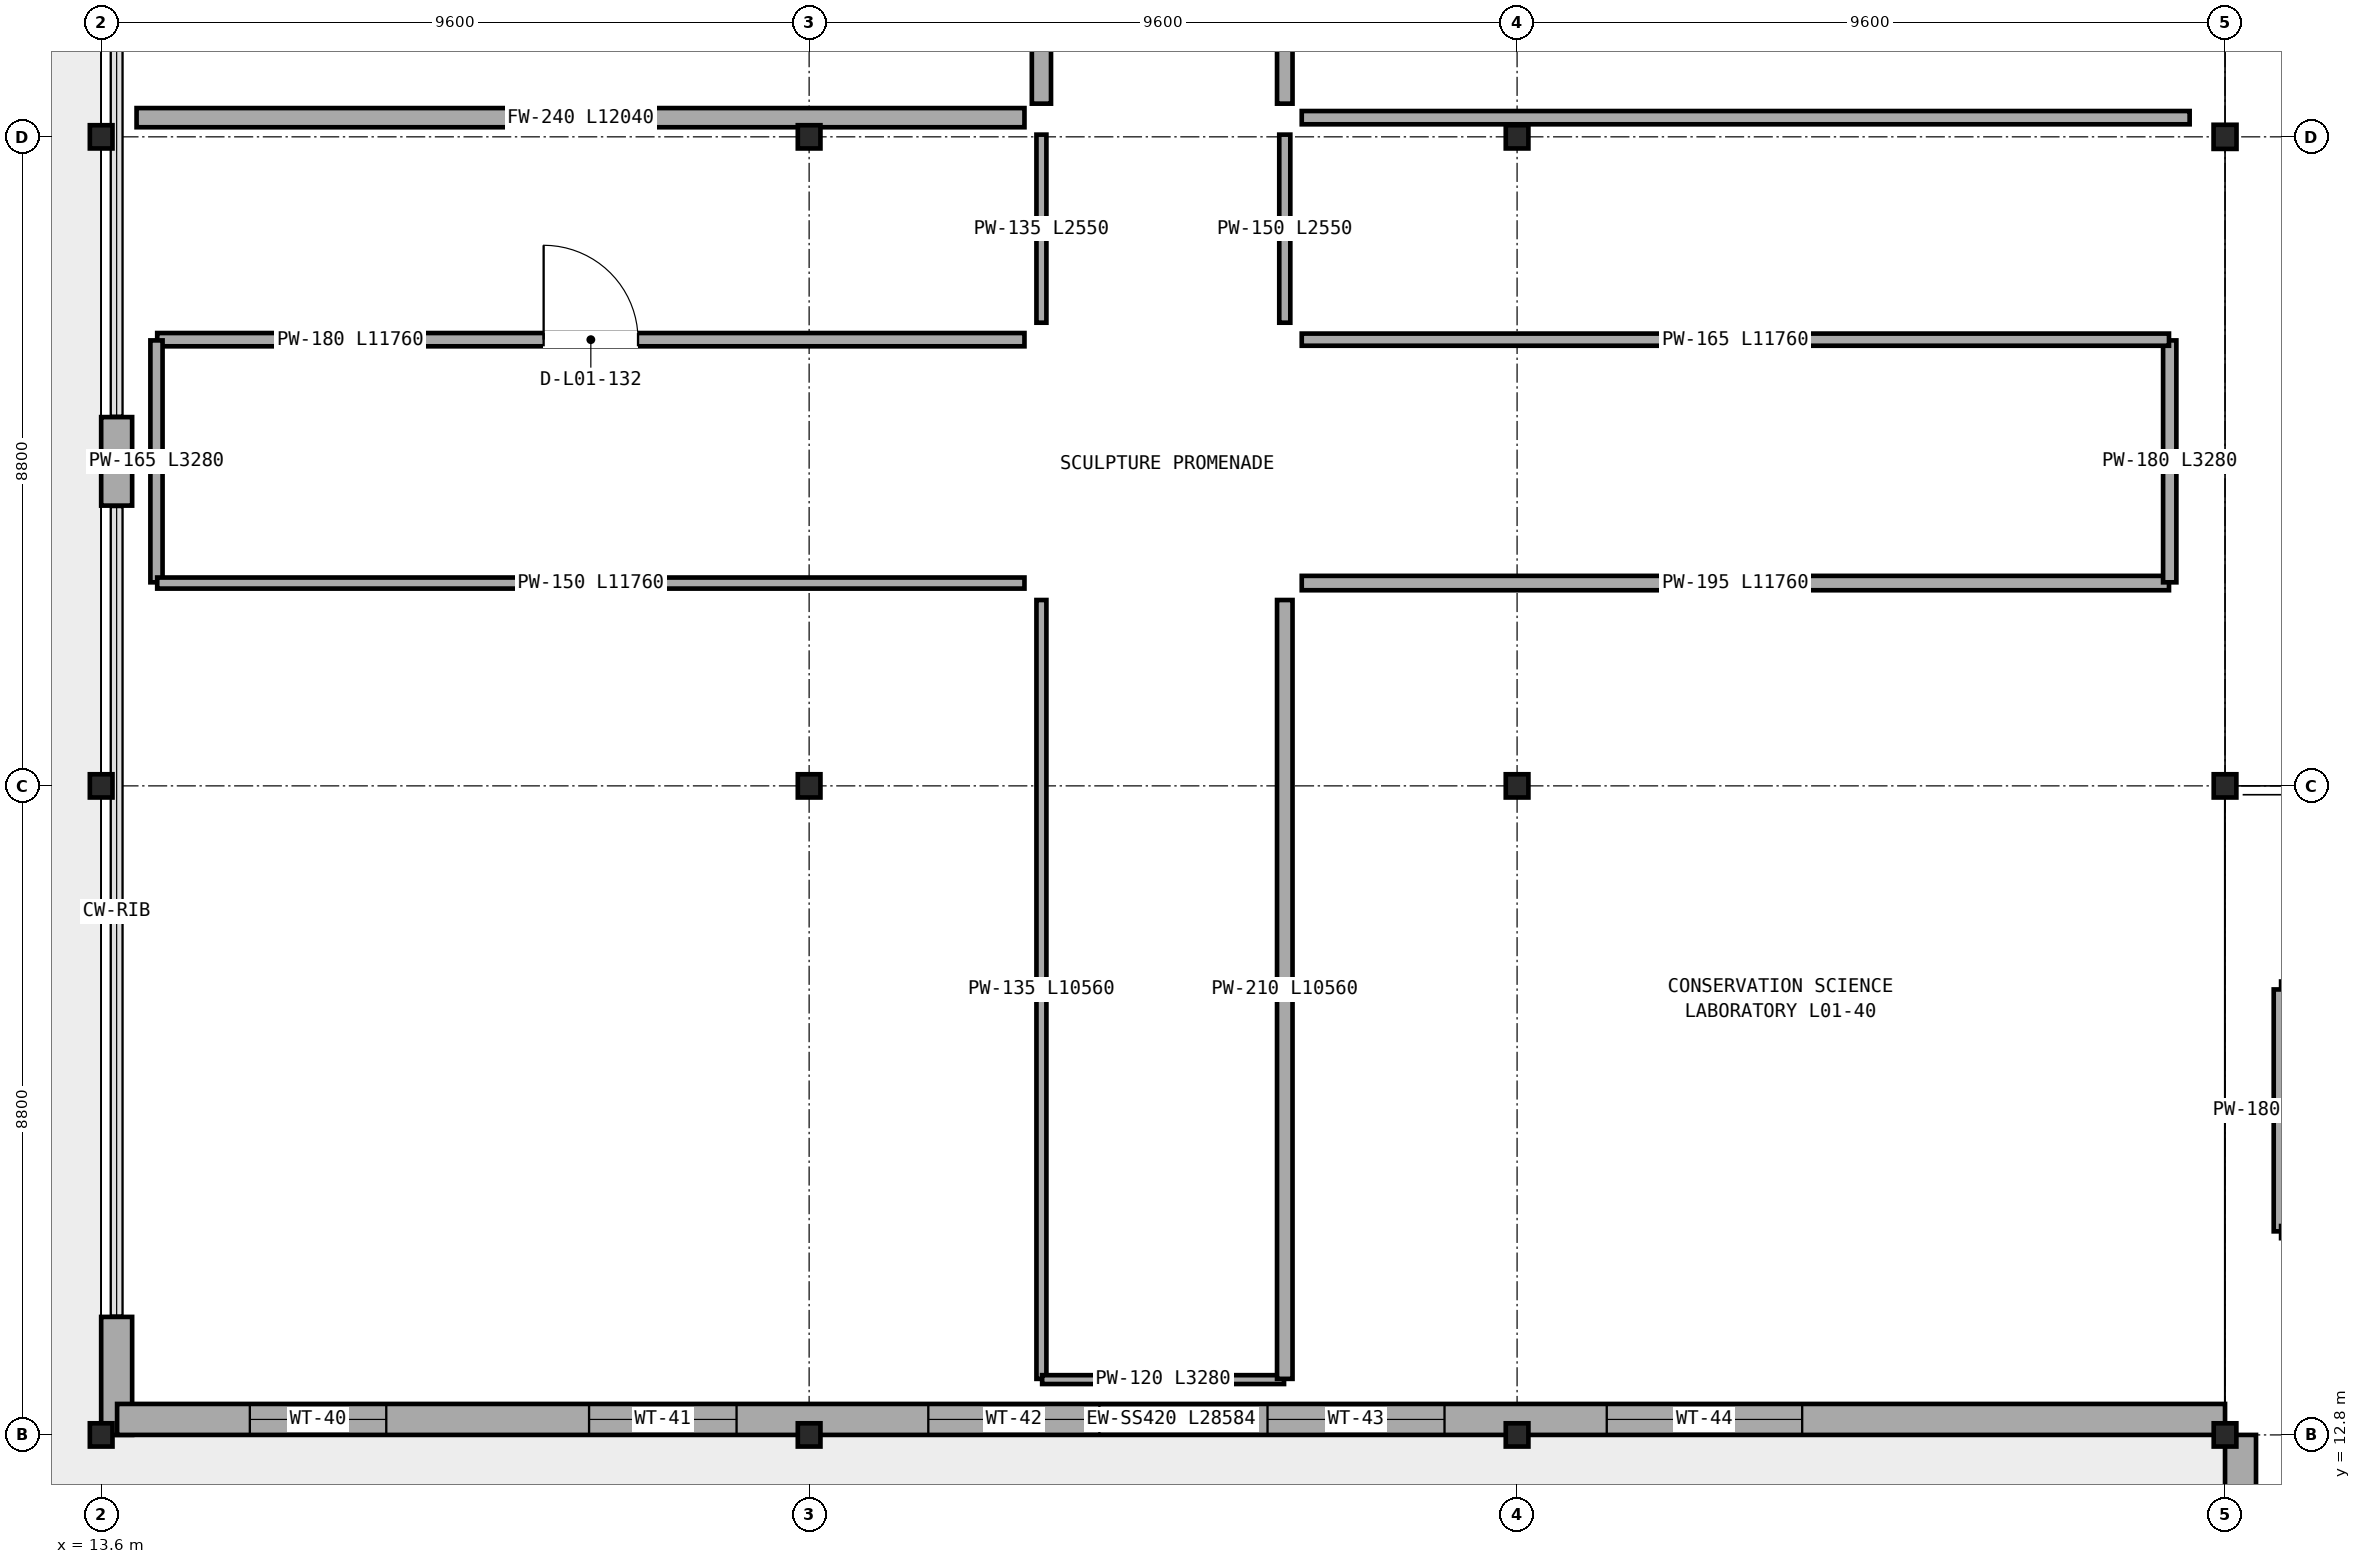
"""IFC4 building model, lengths in metres.
Left out: names, types, materials, properties, quantities, classifications, styles, units other than length and angle.
Written with IfcOpenShell. Run it as: python <this file> out.ifc"""

import sys

from ifc_helpers import new_model, si_unit, direction, frame, frame_2d, origin, origin_2d, place, context, subcontext, project, spatial, rectangle, i_section, extrude, element, fill, save


model = new_model("IFC4")
c1 = context("Model", 3, precision=1e-05, world=origin(), true_north=direction((0.0, 1.0)))
c2 = subcontext(c1, "Body", "Model", "MODEL_VIEW")
j1 = project(units=[si_unit("LENGTHUNIT", "METRE"), si_unit("PLANEANGLEUNIT", "RADIAN")], contexts=[c1])
p1 = place(None, origin())
s1 = spatial("IfcSite", under=j1, at=p1, CompositionType="ELEMENT")
p2 = place(p1, origin())
s2 = spatial("IfcBuilding", under=s1, at=p2, CompositionType="ELEMENT")
p3 = place(p2, frame((0.0, 0.0, 5.6)))
s3 = spatial("IfcBuildingStorey", under=s2, at=p3, CompositionType="ELEMENT", Elevation=5.6)
for number, where, z_axis, x_axis in (
    (1, (13.6, 12.8, 0.0), (0.0, 0.0, 1.0), (1.0, 0.0, 0.0)),
    (2, (13.6, 21.6, 0.0), (0.0, 0.0, 1.0), (1.0, 0.0, 0.0)),
    (3, (13.6, 30.4, 0.0), (0.0, 0.0, 1.0), (1.0, 0.0, 0.0)),
    (4, (23.2, 12.8, 0.0), (0.0, 0.0, 1.0), (1.0, 0.0, 0.0)),
    (5, (23.2, 21.6, 0.0), (0.0, 0.0, 1.0), (1.0, 0.0, 0.0)),
    (6, (23.2, 30.4, 0.0), (0.0, 0.0, 1.0), (1.0, 0.0, 0.0)),
    (7, (32.8, 12.8, 0.0), (0.0, 0.0, 1.0), (1.0, 0.0, 0.0)),
    (8, (32.8, 21.6, 0.0), (0.0, 0.0, 1.0), (1.0, 0.0, 0.0)),
    (9, (32.8, 30.4, 0.0), (0.0, 0.0, 1.0), (1.0, 0.0, 0.0)),
    (10, (42.4, 12.8, 0.0), (0.0, 0.0, 1.0), (1.0, 0.0, 0.0)),
    (11, (42.4, 21.6, 0.0), (0.0, 0.0, 1.0), (1.0, 0.0, 0.0)),
):
    element("IfcColumn", number, at=place(p3, frame(where, z_axis=z_axis, x_axis=x_axis)), inside=s3, PredefinedType="COLUMN", context=c2, shape_type="SweptSolid", body=[
        extrude(i_section(OverallWidth=0.307, OverallDepth=0.315, WebThickness=0.012, FlangeThickness=0.019, FilletRadius=0.017, at=origin_2d()), origin(), (0.0, 0.0, 1.0), 4.5),
    ])
p4 = place(p3, frame((42.4, 30.4, 0.0), z_axis=(0.0, 0.0, 1.0), x_axis=(1.0, 0.0, 0.0)))
e12 = element("IfcColumn", 12, at=p4, inside=s3, PredefinedType="COLUMN", context=c2, shape_type="SweptSolid", body=[
    extrude(i_section(OverallWidth=0.311, OverallDepth=0.327, WebThickness=0.016, FlangeThickness=0.025, FilletRadius=0.017, at=origin_2d()), origin(), (0.0, 0.0, 1.0), 4.5),
])
p5 = place(p3, frame((13.81, 26.6, 0.0), z_axis=(0.0, 0.0, 1.0), x_axis=(0.0, -1.0, 0.0)))
e13 = element("IfcWall", 13, at=p5, inside=s3, PredefinedType="SOLIDWALL", context=c2, shape_type="SweptSolid", body=[
    extrude(rectangle(XDim=1.2, YDim=0.42, at=frame_2d((0.6, 0.0))), origin(), (0.0, 0.0, 1.0), 3.818),
])
p6 = place(p3, frame((13.81, 14.4, 0.0), z_axis=(0.0, 0.0, 1.0), x_axis=(0.0, -1.0, 0.0)))
e14 = element("IfcWall", 14, at=p6, inside=s3, PredefinedType="SOLIDWALL", context=c2, shape_type="SweptSolid", body=[
    extrude(rectangle(XDim=1.6, YDim=0.42, at=frame_2d((0.8, 0.0))), origin(), (0.0, 0.0, 1.0), 3.668),
])
p7 = place(p3, frame((13.816, 13.01, 0.0), z_axis=(0.0, 0.0, 1.0), x_axis=(1.0, 0.0, 0.0)))
e15 = element("IfcWall", 15, at=p7, inside=s3, PredefinedType="SOLIDWALL", context=c2, shape_type="SweptSolid", body=[
    extrude(rectangle(XDim=28.584, YDim=0.42, at=frame_2d((14.292, 0.0))), origin(), (0.0, 0.0, 1.0), 3.668),
])
p8 = place(p7, frame((1.8, 0.0, 0.75)))
e16 = element("IfcOpeningElement", 16, at=p8, cuts=e15, PredefinedType="OPENING", context=c2, shape_type="SweptSolid", body=[
    extrude(rectangle(XDim=1.85, YDim=2.5, at=frame_2d((0.925, 1.25))), frame((0.0, 0.22, 0.0), z_axis=(0.0, -1.0, 0.0), x_axis=(1.0, 0.0, 0.0)), (0.0, 0.0, 1.0), 0.44),
])
p9 = place(p7, frame((6.4, 0.0, 0.75)))
e17 = element("IfcOpeningElement", 17, at=p9, cuts=e15, PredefinedType="OPENING", context=c2, shape_type="SweptSolid", body=[
    extrude(rectangle(XDim=2.0, YDim=2.5, at=frame_2d((1.0, 1.25))), frame((0.0, 0.22, 0.0), z_axis=(0.0, -1.0, 0.0), x_axis=(1.0, 0.0, 0.0)), (0.0, 0.0, 1.0), 0.44),
])
p10 = place(p7, frame((11.0, 0.0, 0.75)))
e18 = element("IfcOpeningElement", 18, at=p10, cuts=e15, PredefinedType="OPENING", context=c2, shape_type="SweptSolid", body=[
    extrude(rectangle(XDim=2.32, YDim=2.5, at=frame_2d((1.16, 1.25))), frame((0.0, 0.22, 0.0), z_axis=(0.0, -1.0, 0.0), x_axis=(1.0, 0.0, 0.0)), (0.0, 0.0, 1.0), 0.44),
])
p11 = place(p7, frame((15.6, 0.0, 0.75)))
e19 = element("IfcOpeningElement", 19, at=p11, cuts=e15, PredefinedType="OPENING", context=c2, shape_type="SweptSolid", body=[
    extrude(rectangle(XDim=2.4, YDim=2.5, at=frame_2d((1.2, 1.25))), frame((0.0, 0.22, 0.0), z_axis=(0.0, -1.0, 0.0), x_axis=(1.0, 0.0, 0.0)), (0.0, 0.0, 1.0), 0.44),
])
p12 = place(p7, frame((20.2, 0.0, 0.75)))
e20 = element("IfcOpeningElement", 20, at=p12, cuts=e15, PredefinedType="OPENING", context=c2, shape_type="SweptSolid", body=[
    extrude(rectangle(XDim=2.65, YDim=2.5, at=frame_2d((1.325, 1.25))), frame((0.0, 0.22, 0.0), z_axis=(0.0, -1.0, 0.0), x_axis=(1.0, 0.0, 0.0)), (0.0, 0.0, 1.0), 0.44),
])
p13 = place(p3, frame((42.61, 12.8, 0.0), z_axis=(0.0, 0.0, 1.0), x_axis=(0.0, -1.0, 0.0)))
e21 = element("IfcWall", 21, at=p13, inside=s3, PredefinedType="SOLIDWALL", context=c2, shape_type="SweptSolid", body=[
    extrude(rectangle(XDim=8.0, YDim=0.42, at=frame_2d((4.0, 0.0))), origin(), (0.0, 0.0, 1.0), 3.818),
])
p14 = place(p13, frame((1.8, 0.0, 0.9)))
e22 = element("IfcOpeningElement", 22, at=p14, cuts=e21, PredefinedType="OPENING", context=c2, shape_type="SweptSolid", body=[
    extrude(rectangle(XDim=0.95, YDim=1.55, at=frame_2d((0.475, 0.775))), frame((0.0, 0.22, 0.0), z_axis=(0.0, -1.0, 0.0), x_axis=(1.0, 0.0, 0.0)), (0.0, 0.0, 1.0), 0.44),
])
p15 = place(p3, frame((43.15, 18.84, 0.0), z_axis=(0.0, 0.0, 1.0), x_axis=(0.0, -1.0, 0.0)))
e23 = element("IfcWall", 23, at=p15, inside=s3, PredefinedType="PARTITIONING", context=c2, shape_type="SweptSolid", body=[
    extrude(rectangle(XDim=3.28, YDim=0.18, at=frame_2d((1.64, 0.0))), origin(), (0.0, 0.0, 1.0), 4.13),
])
p16 = place(p3, frame((26.12, 27.65, 0.0), z_axis=(0.0, 0.0, 1.0), x_axis=(-1.0, 0.0, 0.0)))
e24 = element("IfcWall", 24, at=p16, inside=s3, PredefinedType="PARTITIONING", context=c2, shape_type="SweptSolid", body=[
    extrude(rectangle(XDim=11.76, YDim=0.18, at=frame_2d((5.88, 0.0))), origin(), (0.0, 0.0, 1.0), 3.803),
])
p17 = place(p16, frame((5.24, 0.0, 0.0)))
e25 = element("IfcOpeningElement", 25, at=p17, cuts=e24, PredefinedType="OPENING", context=c2, shape_type="SweptSolid", body=[
    extrude(rectangle(XDim=1.28, YDim=2.24, at=frame_2d((0.64, 1.12))), frame((0.0, 0.1, 0.0), z_axis=(0.0, -1.0, 0.0), x_axis=(1.0, 0.0, 0.0)), (0.0, 0.0, 1.0), 0.2),
])
p18 = place(p3, frame((14.35, 27.64, 0.0), z_axis=(0.0, 0.0, 1.0), x_axis=(0.0, -1.0, 0.0)))
e26 = element("IfcWall", 26, at=p18, inside=s3, PredefinedType="PARTITIONING", context=c2, shape_type="SweptSolid", body=[
    extrude(rectangle(XDim=3.28, YDim=0.165, at=frame_2d((1.64, 0.0))), origin(), (0.0, 0.0, 1.0), 4.13),
])
p19 = place(p3, frame((14.36, 24.35, 0.0), z_axis=(0.0, 0.0, 1.0), x_axis=(1.0, 0.0, 0.0)))
e27 = element("IfcWall", 27, at=p19, inside=s3, PredefinedType="PARTITIONING", context=c2, shape_type="SweptSolid", body=[
    extrude(rectangle(XDim=11.76, YDim=0.15, at=frame_2d((5.88, 0.0))), origin(), (0.0, 0.0, 1.0), 3.803),
])
p20 = place(p3, frame((26.35, 24.12, 0.0), z_axis=(0.0, 0.0, 1.0), x_axis=(0.0, -1.0, 0.0)))
e28 = element("IfcWall", 28, at=p20, inside=s3, PredefinedType="PARTITIONING", context=c2, shape_type="SweptSolid", body=[
    extrude(rectangle(XDim=10.56, YDim=0.135, at=frame_2d((5.28, 0.0))), origin(), (0.0, 0.0, 1.0), 3.653),
])
p21 = place(p3, frame((26.36, 13.55, 0.0), z_axis=(0.0, 0.0, 1.0), x_axis=(1.0, 0.0, 0.0)))
e29 = element("IfcWall", 29, at=p21, inside=s3, PredefinedType="PARTITIONING", context=c2, shape_type="SweptSolid", body=[
    extrude(rectangle(XDim=3.28, YDim=0.12, at=frame_2d((1.64, 0.0))), origin(), (0.0, 0.0, 1.0), 3.904),
])
p22 = place(p3, frame((29.65, 13.56, 0.0), z_axis=(0.0, 0.0, 1.0), x_axis=(0.0, 1.0, 0.0)))
e30 = element("IfcWall", 30, at=p22, inside=s3, PredefinedType="PARTITIONING", context=c2, shape_type="SweptSolid", body=[
    extrude(rectangle(XDim=10.56, YDim=0.21, at=frame_2d((5.28, 0.0))), origin(), (0.0, 0.0, 1.0), 3.653),
])
p23 = place(p3, frame((29.88, 24.35, 0.0), z_axis=(0.0, 0.0, 1.0), x_axis=(1.0, 0.0, 0.0)))
e31 = element("IfcWall", 31, at=p23, inside=s3, PredefinedType="PARTITIONING", context=c2, shape_type="SweptSolid", body=[
    extrude(rectangle(XDim=11.76, YDim=0.195, at=frame_2d((5.88, 0.0))), origin(), (0.0, 0.0, 1.0), 3.803),
])
p24 = place(p3, frame((41.65, 24.36, 0.0), z_axis=(0.0, 0.0, 1.0), x_axis=(0.0, 1.0, 0.0)))
e32 = element("IfcWall", 32, at=p24, inside=s3, PredefinedType="PARTITIONING", context=c2, shape_type="SweptSolid", body=[
    extrude(rectangle(XDim=3.28, YDim=0.18, at=frame_2d((1.64, 0.0))), origin(), (0.0, 0.0, 1.0), 4.13),
])
p25 = place(p3, frame((41.64, 27.65, 0.0), z_axis=(0.0, 0.0, 1.0), x_axis=(-1.0, 0.0, 0.0)))
e33 = element("IfcWall", 33, at=p25, inside=s3, PredefinedType="PARTITIONING", context=c2, shape_type="SweptSolid", body=[
    extrude(rectangle(XDim=11.76, YDim=0.165, at=frame_2d((5.88, 0.0))), origin(), (0.0, 0.0, 1.0), 3.803),
])
p26 = place(p3, frame((29.65, 27.88, 0.0), z_axis=(0.0, 0.0, 1.0), x_axis=(0.0, 1.0, 0.0)))
e34 = element("IfcWall", 34, at=p26, inside=s3, PredefinedType="PARTITIONING", context=c2, shape_type="SweptSolid", body=[
    extrude(rectangle(XDim=2.55, YDim=0.15, at=frame_2d((1.275, 0.0))), origin(), (0.0, 0.0, 1.0), 3.653),
])
p27 = place(p3, frame((26.35, 30.43, 0.0), z_axis=(0.0, 0.0, 1.0), x_axis=(0.0, -1.0, 0.0)))
e35 = element("IfcWall", 35, at=p27, inside=s3, PredefinedType="PARTITIONING", context=c2, shape_type="SweptSolid", body=[
    extrude(rectangle(XDim=2.55, YDim=0.135, at=frame_2d((1.275, 0.0))), origin(), (0.0, 0.0, 1.0), 3.653),
])
p28 = place(p3, frame((26.35, 38.84, 0.0), z_axis=(0.0, 0.0, 1.0), x_axis=(0.0, -1.0, 0.0)))
e36 = element("IfcWall", 36, at=p28, inside=s3, PredefinedType="SOLIDWALL", context=c2, shape_type="SweptSolid", body=[
    extrude(rectangle(XDim=7.99, YDim=0.26, at=frame_2d((3.995, 0.0))), origin(), (0.0, 0.0, 1.0), 4.13),
])
p29 = place(p28, frame((3.195, 0.0, 0.0)))
e37 = element("IfcOpeningElement", 37, at=p29, cuts=e36, PredefinedType="OPENING", context=c2, shape_type="SweptSolid", body=[
    extrude(rectangle(XDim=1.6, YDim=2.4, at=frame_2d((0.8, 1.2))), frame((0.0, 0.14, 0.0), z_axis=(0.0, -1.0, 0.0), x_axis=(1.0, 0.0, 0.0)), (0.0, 0.0, 1.0), 0.28),
])
p30 = place(p3, frame((29.65, 30.85, 0.0), z_axis=(0.0, 0.0, 1.0), x_axis=(0.0, 1.0, 0.0)))
e38 = element("IfcWall", 38, at=p30, inside=s3, PredefinedType="PARTITIONING", context=c2, shape_type="SweptSolid", body=[
    extrude(rectangle(XDim=7.99, YDim=0.21, at=frame_2d((3.995, 0.0))), origin(), (0.0, 0.0, 1.0), 4.13),
])
p31 = place(p30, frame((3.47, 0.0, 0.0)))
e39 = element("IfcOpeningElement", 39, at=p31, cuts=e38, PredefinedType="OPENING", context=c2, shape_type="SweptSolid", body=[
    extrude(rectangle(XDim=1.05, YDim=2.15, at=frame_2d((0.525, 1.075))), frame((0.0, 0.115, 0.0), z_axis=(0.0, -1.0, 0.0), x_axis=(1.0, 0.0, 0.0)), (0.0, 0.0, 1.0), 0.23),
])
p32 = place(p3, frame((14.08, 30.66, 0.0), z_axis=(0.0, 0.0, 1.0), x_axis=(1.0, 0.0, 0.0)))
e40 = element("IfcWall", 40, at=p32, inside=s3, PredefinedType="SOLIDWALL", context=c2, shape_type="SweptSolid", body=[
    extrude(rectangle(XDim=12.04, YDim=0.26, at=frame_2d((6.02, 0.0))), origin(), (0.0, 0.0, 1.0), 2.9),
])
p33 = place(p3, frame((29.88, 30.66, 0.0), z_axis=(0.0, 0.0, 1.0), x_axis=(1.0, 0.0, 0.0)))
e41 = element("IfcWall", 41, at=p33, inside=s3, PredefinedType="PARTITIONING", context=c2, shape_type="SweptSolid", body=[
    extrude(rectangle(XDim=12.04, YDim=0.18, at=frame_2d((6.02, 0.0))), origin(), (0.0, 0.0, 1.0), 3.653),
])
p34 = place(p8, origin())
e42 = element("IfcWindow", 42, at=p34, inside=s3, PartitioningType="SINGLE_PANEL", PredefinedType="WINDOW", context=c2, shape_type="SweptSolid", body=[
    extrude(rectangle(XDim=1.85, YDim=2.5, at=frame_2d((0.925, 1.25))), frame((0.0, 0.03, 0.0), z_axis=(0.0, -1.0, 0.0), x_axis=(1.0, 0.0, 0.0)), (0.0, 0.0, 1.0), 0.06),
])
fill(e16, e42)
p35 = place(p9, origin())
e43 = element("IfcWindow", 43, at=p35, inside=s3, PartitioningType="SINGLE_PANEL", PredefinedType="WINDOW", context=c2, shape_type="SweptSolid", body=[
    extrude(rectangle(XDim=2.0, YDim=2.5, at=frame_2d((1.0, 1.25))), frame((0.0, 0.03, 0.0), z_axis=(0.0, -1.0, 0.0), x_axis=(1.0, 0.0, 0.0)), (0.0, 0.0, 1.0), 0.06),
])
fill(e17, e43)
p36 = place(p10, origin())
e44 = element("IfcWindow", 44, at=p36, inside=s3, PartitioningType="SINGLE_PANEL", PredefinedType="WINDOW", context=c2, shape_type="SweptSolid", body=[
    extrude(rectangle(XDim=2.32, YDim=2.5, at=frame_2d((1.16, 1.25))), frame((0.0, 0.03, 0.0), z_axis=(0.0, -1.0, 0.0), x_axis=(1.0, 0.0, 0.0)), (0.0, 0.0, 1.0), 0.06),
])
fill(e18, e44)
p37 = place(p11, origin())
e45 = element("IfcWindow", 45, at=p37, inside=s3, PartitioningType="SINGLE_PANEL", PredefinedType="WINDOW", context=c2, shape_type="SweptSolid", body=[
    extrude(rectangle(XDim=2.4, YDim=2.5, at=frame_2d((1.2, 1.25))), frame((0.0, 0.03, 0.0), z_axis=(0.0, -1.0, 0.0), x_axis=(1.0, 0.0, 0.0)), (0.0, 0.0, 1.0), 0.06),
])
fill(e19, e45)
p38 = place(p12, origin())
e46 = element("IfcWindow", 46, at=p38, inside=s3, PartitioningType="SINGLE_PANEL", PredefinedType="WINDOW", context=c2, shape_type="SweptSolid", body=[
    extrude(rectangle(XDim=2.65, YDim=2.5, at=frame_2d((1.325, 1.25))), frame((0.0, 0.03, 0.0), z_axis=(0.0, -1.0, 0.0), x_axis=(1.0, 0.0, 0.0)), (0.0, 0.0, 1.0), 0.06),
])
fill(e20, e46)
p39 = place(p17, frame((1.28, 0.0, 0.0), z_axis=(0.0, 0.0, 1.0), x_axis=(-1.0, 0.0, 0.0)))
e47 = element("IfcDoor", 47, at=p39, inside=s3, OperationType="SINGLE_SWING_RIGHT", PredefinedType="DOOR", context=c2, shape_type="SweptSolid", body=[
    extrude(rectangle(XDim=1.28, YDim=2.24, at=frame_2d((0.64, 1.12))), frame((0.0, 0.025, 0.0), z_axis=(0.0, -1.0, 0.0), x_axis=(1.0, 0.0, 0.0)), (0.0, 0.0, 1.0), 0.05),
])
fill(e25, e47)
save(model, sys.argv[1])
